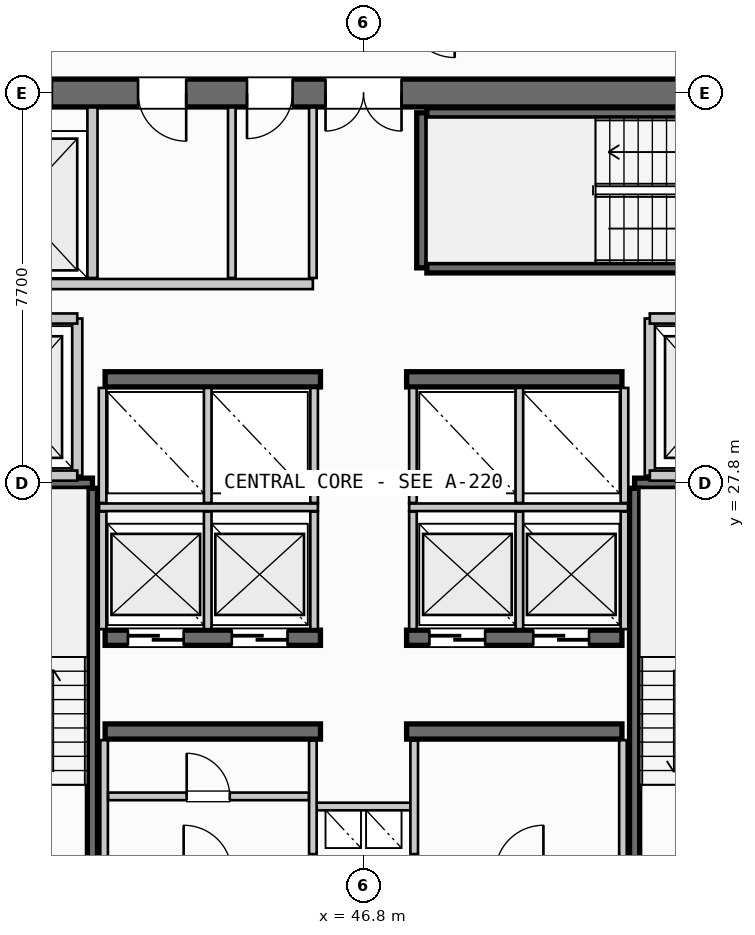
"""IFC4 building model, lengths in metres.
Left out: names, types, materials, properties, quantities, classifications, styles, units other than length and angle.
Written with IfcOpenShell. Run it as: python <this file> out.ifc"""

import sys

from ifc_helpers import new_model, si_unit, direction, frame, frame_2d, origin, place, context, subcontext, project, spatial, rectangle, extrude, source, transform, mapped, element, fill, save


model = new_model("IFC4")
c1 = context("Model", 3, precision=1e-05, world=origin(), true_north=direction((0.0, 1.0)))
c2 = subcontext(c1, "Body", "Model", "MODEL_VIEW")
j1 = project(units=[si_unit("LENGTHUNIT", "METRE"), si_unit("PLANEANGLEUNIT", "RADIAN")], contexts=[c1])
p1 = place(None, origin())
s1 = spatial("IfcSite", under=j1, at=p1, CompositionType="ELEMENT")
p2 = place(p1, origin())
s2 = spatial("IfcBuilding", under=s1, at=p2, CompositionType="ELEMENT")
p3 = place(p2, frame((0.0, 0.0, 146.55)))
s3 = spatial("IfcBuildingStorey", under=s2, at=p3, CompositionType="ELEMENT", Elevation=146.55)
p4 = place(p3, frame((55.6, 35.5, 0.0), z_axis=(0.0, 0.0, 1.0), x_axis=(-1.0, 0.0, 0.0)))
e1 = element("IfcWall", 1, at=p4, inside=s3, PredefinedType="SHEAR", context=c2, shape_type="SweptSolid", body=[
    extrude(rectangle(XDim=17.6, YDim=0.55, at=frame_2d((8.8, 0.0))), origin(), (0.0, 0.0, 1.0), 3.3),
])
p5 = place(p4, frame((8.05, 0.0, 0.0)))
e2 = element("IfcOpeningElement", 2, at=p5, cuts=e1, PredefinedType="OPENING", context=c2, shape_type="SweptSolid", body=[
    extrude(rectangle(XDim=1.5, YDim=2.2, at=frame_2d((0.75, 1.1))), frame((0.0, 0.285, 0.0), z_axis=(0.0, -1.0, 0.0), x_axis=(1.0, 0.0, 0.0)), (0.0, 0.0, 1.0), 0.57),
])
p6 = place(p4, frame((14.95, 0.0, 0.0)))
e3 = element("IfcOpeningElement", 3, at=p6, cuts=e1, PredefinedType="OPENING", context=c2, shape_type="SweptSolid", body=[
    extrude(rectangle(XDim=1.4, YDim=2.3, at=frame_2d((0.7, 1.15))), frame((0.0, 0.285, 0.0), z_axis=(0.0, -1.0, 0.0), x_axis=(1.0, 0.0, 0.0)), (0.0, 0.0, 1.0), 0.57),
])
p7 = place(p4, frame((12.3, 0.0, 0.0)))
e4 = element("IfcOpeningElement", 4, at=p7, cuts=e1, PredefinedType="OPENING", context=c2, shape_type="SweptSolid", body=[
    extrude(rectangle(XDim=0.95, YDim=2.15, at=frame_2d((0.475, 1.075))), frame((0.0, 0.285, 0.0), z_axis=(0.0, -1.0, 0.0), x_axis=(1.0, 0.0, 0.0)), (0.0, 0.0, 1.0), 0.57),
])
p8 = place(p4, frame((10.2, 0.0, 0.0)))
e5 = element("IfcOpeningElement", 5, at=p8, cuts=e1, PredefinedType="OPENING", context=c2, shape_type="SweptSolid", body=[
    extrude(rectangle(XDim=0.9, YDim=2.15, at=frame_2d((0.45, 1.075))), frame((0.0, 0.285, 0.0), z_axis=(0.0, -1.0, 0.0), x_axis=(1.0, 0.0, 0.0)), (0.0, 0.0, 1.0), 0.57),
])
for number, where, z_axis, x_axis in (
    (6, (41.7, 22.9, 0.0), (0.0, 0.0, 1.0), (1.0, 0.0, 0.0)),
    (7, (47.65, 22.9, 0.0), (0.0, 0.0, 1.0), (1.0, 0.0, 0.0)),
):
    element("IfcWall", number, at=place(p3, frame(where, z_axis=z_axis, x_axis=x_axis)), inside=s3, PredefinedType="SHEAR", context=c2, shape_type="SweptSolid", body=[
        extrude(rectangle(XDim=4.25, YDim=0.3, at=frame_2d((2.125, 0.0))), origin(), (0.0, 0.0, 1.0), 3.3),
    ])
p9 = place(p3, frame((41.7, 24.75, 0.0), z_axis=(0.0, 0.0, 1.0), x_axis=(1.0, 0.0, 0.0)))
e8 = element("IfcWall", 8, at=p9, inside=s3, PredefinedType="SHEAR", context=c2, shape_type="SweptSolid", body=[
    extrude(rectangle(XDim=4.25, YDim=0.3, at=frame_2d((2.125, 0.0))), origin(), (0.0, 0.0, 1.0), 3.3),
])
p10 = place(p9, frame((0.45, 0.0, 0.0)))
e9 = element("IfcOpeningElement", 9, at=p10, cuts=e8, PredefinedType="OPENING", context=c2, shape_type="SweptSolid", body=[
    extrude(rectangle(XDim=1.1, YDim=2.2, at=frame_2d((0.55, 1.1))), frame((0.0, 0.16, 0.0), z_axis=(0.0, -1.0, 0.0), x_axis=(1.0, 0.0, 0.0)), (0.0, 0.0, 1.0), 0.32),
])
p11 = place(p9, frame((2.5, 0.0, 0.0)))
e10 = element("IfcOpeningElement", 10, at=p11, cuts=e8, PredefinedType="OPENING", context=c2, shape_type="SweptSolid", body=[
    extrude(rectangle(XDim=1.1, YDim=2.2, at=frame_2d((0.55, 1.1))), frame((0.0, 0.16, 0.0), z_axis=(0.0, -1.0, 0.0), x_axis=(1.0, 0.0, 0.0)), (0.0, 0.0, 1.0), 0.32),
])
p12 = place(p3, frame((47.65, 24.75, 0.0), z_axis=(0.0, 0.0, 1.0), x_axis=(1.0, 0.0, 0.0)))
e11 = element("IfcWall", 11, at=p12, inside=s3, PredefinedType="SHEAR", context=c2, shape_type="SweptSolid", body=[
    extrude(rectangle(XDim=4.25, YDim=0.3, at=frame_2d((2.125, 0.0))), origin(), (0.0, 0.0, 1.0), 3.3),
])
p13 = place(p12, frame((0.45, 0.0, 0.0)))
e12 = element("IfcOpeningElement", 12, at=p13, cuts=e11, PredefinedType="OPENING", context=c2, shape_type="SweptSolid", body=[
    extrude(rectangle(XDim=1.1, YDim=2.2, at=frame_2d((0.55, 1.1))), frame((0.0, 0.16, 0.0), z_axis=(0.0, -1.0, 0.0), x_axis=(1.0, 0.0, 0.0)), (0.0, 0.0, 1.0), 0.32),
])
p14 = place(p12, frame((2.5, 0.0, 0.0)))
e13 = element("IfcOpeningElement", 13, at=p14, cuts=e11, PredefinedType="OPENING", context=c2, shape_type="SweptSolid", body=[
    extrude(rectangle(XDim=1.1, YDim=2.2, at=frame_2d((0.55, 1.1))), frame((0.0, 0.16, 0.0), z_axis=(0.0, -1.0, 0.0), x_axis=(1.0, 0.0, 0.0)), (0.0, 0.0, 1.0), 0.32),
])
for number, where, z_axis, x_axis in (
    (14, (41.7, 29.85, 0.0), (0.0, 0.0, 1.0), (1.0, 0.0, 0.0)),
    (15, (47.65, 29.85, 0.0), (0.0, 0.0, 1.0), (1.0, 0.0, 0.0)),
):
    element("IfcWall", number, at=place(p3, frame(where, z_axis=z_axis, x_axis=x_axis)), inside=s3, PredefinedType="SHEAR", context=c2, shape_type="SweptSolid", body=[
        extrude(rectangle(XDim=4.25, YDim=0.3, at=frame_2d((2.125, 0.0))), origin(), (0.0, 0.0, 1.0), 3.3),
    ])
p15 = place(p3, frame((38.39, 27.8, 0.0), z_axis=(0.0, 0.0, 1.0), x_axis=(1.0, 0.0, 0.0)))
e16 = element("IfcWall", 16, at=p15, inside=s3, PredefinedType="SHEAR", context=c2, shape_type="SweptSolid", body=[
    extrude(rectangle(XDim=3.06, YDim=0.2, at=frame_2d((1.53, 0.0))), origin(), (0.0, 0.0, 1.0), 3.3),
])
p16 = place(p3, frame((41.45, 27.7, 0.0), z_axis=(0.0, 0.0, 1.0), x_axis=(0.0, -1.0, 0.0)))
e17 = element("IfcWall", 17, at=p16, inside=s3, PredefinedType="SHEAR", context=c2, shape_type="SweptSolid", body=[
    extrude(rectangle(XDim=7.35, YDim=0.2, at=frame_2d((3.675, 0.0))), origin(), (0.0, 0.0, 1.0), 3.3),
])
p17 = place(p3, frame((52.15, 27.8, 0.0), z_axis=(0.0, 0.0, 1.0), x_axis=(1.0, 0.0, 0.0)))
e18 = element("IfcWall", 18, at=p17, inside=s3, PredefinedType="SHEAR", context=c2, shape_type="SweptSolid", body=[
    extrude(rectangle(XDim=3.06, YDim=0.2, at=frame_2d((1.53, 0.0))), origin(), (0.0, 0.0, 1.0), 3.3),
])
p18 = place(p3, frame((52.15, 20.35, 0.0), z_axis=(0.0, 0.0, 1.0), x_axis=(0.0, 1.0, 0.0)))
e19 = element("IfcWall", 19, at=p18, inside=s3, PredefinedType="SHEAR", context=c2, shape_type="SweptSolid", body=[
    extrude(rectangle(XDim=7.35, YDim=0.2, at=frame_2d((3.675, 0.0))), origin(), (0.0, 0.0, 1.0), 3.3),
])
p19 = place(p3, frame((47.95, 32.05, 0.0), z_axis=(0.0, 0.0, 1.0), x_axis=(0.0, 1.0, 0.0)))
e20 = element("IfcWall", 20, at=p19, inside=s3, PredefinedType="SHEAR", context=c2, shape_type="SweptSolid", body=[
    extrude(rectangle(XDim=3.06, YDim=0.2, at=frame_2d((1.53, 0.0))), origin(), (0.0, 0.0, 1.0), 3.3),
])
for number, where, z_axis, x_axis in (
    (21, (48.05, 35.11, 0.0), (0.0, 0.0, 1.0), (1.0, 0.0, 0.0)),
    (22, (55.4, 32.05, 0.0), (0.0, 0.0, 1.0), (-1.0, 0.0, 0.0)),
):
    element("IfcWall", number, at=place(p3, frame(where, z_axis=z_axis, x_axis=x_axis)), inside=s3, PredefinedType="SHEAR", context=c2, shape_type="SweptSolid", body=[
        extrude(rectangle(XDim=7.35, YDim=0.2, at=frame_2d((3.675, 0.0))), origin(), (0.0, 0.0, 1.0), 3.3),
    ])
p20 = place(p3, frame((45.8, 21.42, 0.0), z_axis=(0.0, 0.0, 1.0), x_axis=(1.0, 0.0, 0.0)))
e23 = element("IfcWall", 23, at=p20, inside=s3, PredefinedType="PARTITIONING", context=c2, shape_type="SweptSolid", body=[
    extrude(rectangle(XDim=2.0, YDim=0.15, at=frame_2d((1.0, 0.0))), origin(), (0.0, 0.0, 1.0), 2.305),
])
for number, where, z_axis, x_axis in (
    (24, (45.8, 20.48, 0.0), (0.0, 0.0, 1.0), (0.0, 1.0, 0.0)),
    (25, (47.8, 20.48, 0.0), (0.0, 0.0, 1.0), (0.0, 1.0, 0.0)),
):
    element("IfcWall", number, at=place(p3, frame(where, z_axis=z_axis, x_axis=x_axis)), inside=s3, PredefinedType="PARTITIONING", context=c2, shape_type="SweptSolid", body=[
        extrude(rectangle(XDim=2.24, YDim=0.15, at=frame_2d((1.12, 0.0))), origin(), (0.0, 0.0, 1.0), 2.305),
    ])
p21 = place(p3, frame((41.15, 27.95, 0.0), z_axis=(0.0, 0.0, 1.0), x_axis=(0.0, 1.0, 0.0)))
e26 = element("IfcWall", 26, at=p21, inside=s3, PredefinedType="PARTITIONING", context=c2, shape_type="SweptSolid", body=[
    extrude(rectangle(XDim=3.1, YDim=0.2, at=frame_2d((1.55, 0.0))), origin(), (0.0, 0.0, 1.0), 2.305),
])
for number, where, z_axis, x_axis in (
    (27, (38.285, 27.95, 0.0), (0.0, 0.0, 1.0), (1.0, 0.0, 0.0)),
    (28, (38.285, 31.05, 0.0), (0.0, 0.0, 1.0), (1.0, 0.0, 0.0)),
):
    element("IfcWall", number, at=place(p3, frame(where, z_axis=z_axis, x_axis=x_axis)), inside=s3, PredefinedType="PARTITIONING", context=c2, shape_type="SweptSolid", body=[
        extrude(rectangle(XDim=2.865, YDim=0.2, at=frame_2d((1.433, 0.0))), origin(), (0.0, 0.0, 1.0), 2.305),
    ])
p22 = place(p3, frame((52.45, 27.95, 0.0), z_axis=(0.0, 0.0, 1.0), x_axis=(0.0, 1.0, 0.0)))
e29 = element("IfcWall", 29, at=p22, inside=s3, PredefinedType="PARTITIONING", context=c2, shape_type="SweptSolid", body=[
    extrude(rectangle(XDim=3.1, YDim=0.2, at=frame_2d((1.55, 0.0))), origin(), (0.0, 0.0, 1.0), 2.305),
])
for number, where, z_axis, x_axis in (
    (30, (52.45, 27.95, 0.0), (0.0, 0.0, 1.0), (1.0, 0.0, 0.0)),
    (31, (52.45, 31.05, 0.0), (0.0, 0.0, 1.0), (1.0, 0.0, 0.0)),
):
    element("IfcWall", number, at=place(p3, frame(where, z_axis=z_axis, x_axis=x_axis)), inside=s3, PredefinedType="PARTITIONING", context=c2, shape_type="SweptSolid", body=[
        extrude(rectangle(XDim=2.865, YDim=0.2, at=frame_2d((1.433, 0.0))), origin(), (0.0, 0.0, 1.0), 2.305),
    ])
for number, where, z_axis, x_axis in (
    (32, (41.68, 20.385, 0.0), (0.0, 0.0, 1.0), (0.0, 1.0, 0.0)),
    (33, (51.92, 20.385, 0.0), (0.0, 0.0, 1.0), (0.0, 1.0, 0.0)),
):
    element("IfcWall", number, at=place(p3, frame(where, z_axis=z_axis, x_axis=x_axis)), inside=s3, PredefinedType="PARTITIONING", context=c2, shape_type="SweptSolid", body=[
        extrude(rectangle(XDim=2.345, YDim=0.15, at=frame_2d((1.172, 0.0))), origin(), (0.0, 0.0, 1.0), 2.305),
    ])
p23 = place(p3, frame((41.76, 21.62, 0.0), z_axis=(0.0, 0.0, 1.0), x_axis=(1.0, 0.0, 0.0)))
e34 = element("IfcWall", 34, at=p23, inside=s3, PredefinedType="PARTITIONING", context=c2, shape_type="SweptSolid", body=[
    extrude(rectangle(XDim=3.96, YDim=0.15, at=frame_2d((1.98, 0.0))), origin(), (0.0, 0.0, 1.0), 2.305),
])
p24 = place(p23, frame((1.55, 0.0, 0.0)))
e35 = element("IfcOpeningElement", 35, at=p24, cuts=e34, PredefinedType="OPENING", context=c2, shape_type="SweptSolid", body=[
    extrude(rectangle(XDim=0.85, YDim=2.15, at=frame_2d((0.425, 1.075))), frame((0.0, 0.085, 0.0), z_axis=(0.0, -1.0, 0.0), x_axis=(1.0, 0.0, 0.0)), (0.0, 0.0, 1.0), 0.17),
])
p25 = place(p3, frame((41.58, 27.325, 0.0), z_axis=(0.0, 0.0, 1.0), x_axis=(1.0, 0.0, 0.0)))
e36 = element("IfcWall", 36, at=p25, inside=s3, PredefinedType="PARTITIONING", context=c2, shape_type="SweptSolid", body=[
    extrude(rectangle(XDim=4.32, YDim=0.15, at=frame_2d((2.16, 0.0))), origin(), (0.0, 0.0, 1.0), 2.305),
])
p26 = place(p3, frame((47.7, 27.325, 0.0), z_axis=(0.0, 0.0, 1.0), x_axis=(1.0, 0.0, 0.0)))
e37 = element("IfcWall", 37, at=p26, inside=s3, PredefinedType="PARTITIONING", context=c2, shape_type="SweptSolid", body=[
    extrude(rectangle(XDim=4.32, YDim=0.15, at=frame_2d((2.16, 0.0))), origin(), (0.0, 0.0, 1.0), 2.305),
])
for number, where, z_axis, x_axis in (
    (38, (41.65, 24.92, 0.0), (0.0, 0.0, 1.0), (0.0, 1.0, 0.0)),
    (39, (43.725, 24.92, 0.0), (0.0, 0.0, 1.0), (0.0, 1.0, 0.0)),
    (40, (45.825, 24.92, 0.0), (0.0, 0.0, 1.0), (0.0, 1.0, 0.0)),
    (41, (47.775, 24.92, 0.0), (0.0, 0.0, 1.0), (0.0, 1.0, 0.0)),
    (42, (49.875, 24.92, 0.0), (0.0, 0.0, 1.0), (0.0, 1.0, 0.0)),
    (43, (51.95, 24.92, 0.0), (0.0, 0.0, 1.0), (0.0, 1.0, 0.0)),
):
    element("IfcWall", number, at=place(p3, frame(where, z_axis=z_axis, x_axis=x_axis)), inside=s3, PredefinedType="PARTITIONING", context=c2, shape_type="SweptSolid", body=[
        extrude(rectangle(XDim=2.32, YDim=0.15, at=frame_2d((1.16, 0.0))), origin(), (0.0, 0.0, 1.0), 2.305),
    ])
for number, where, z_axis, x_axis in (
    (44, (41.65, 27.41, 0.0), (0.0, 0.0, 1.0), (0.0, 1.0, 0.0)),
    (45, (43.725, 27.41, 0.0), (0.0, 0.0, 1.0), (0.0, 1.0, 0.0)),
    (46, (45.825, 27.41, 0.0), (0.0, 0.0, 1.0), (0.0, 1.0, 0.0)),
    (47, (47.775, 27.41, 0.0), (0.0, 0.0, 1.0), (0.0, 1.0, 0.0)),
    (48, (49.875, 27.41, 0.0), (0.0, 0.0, 1.0), (0.0, 1.0, 0.0)),
    (49, (51.95, 27.41, 0.0), (0.0, 0.0, 1.0), (0.0, 1.0, 0.0)),
):
    element("IfcWall", number, at=place(p3, frame(where, z_axis=z_axis, x_axis=x_axis)), inside=s3, PredefinedType="PARTITIONING", context=c2, shape_type="SweptSolid", body=[
        extrude(rectangle(XDim=2.27, YDim=0.15, at=frame_2d((1.135, 0.0))), origin(), (0.0, 0.0, 1.0), 2.305),
    ])
p27 = place(p3, frame((41.45, 31.85, 0.0), z_axis=(0.0, 0.0, 1.0), x_axis=(0.0, 1.0, 0.0)))
e50 = element("IfcWall", 50, at=p27, inside=s3, PredefinedType="PARTITIONING", context=c2, shape_type="SweptSolid", body=[
    extrude(rectangle(XDim=3.365, YDim=0.2, at=frame_2d((1.683, 0.0))), origin(), (0.0, 0.0, 1.0), 2.305),
])
p28 = place(p3, frame((38.285, 31.73, 0.0), z_axis=(0.0, 0.0, 1.0), x_axis=(1.0, 0.0, 0.0)))
e51 = element("IfcWall", 51, at=p28, inside=s3, PredefinedType="PARTITIONING", context=c2, shape_type="SweptSolid", body=[
    extrude(rectangle(XDim=7.515, YDim=0.2, at=frame_2d((3.758, 0.0))), origin(), (0.0, 0.0, 1.0), 2.305),
])
p29 = place(p3, frame((45.8, 31.85, 0.0), z_axis=(0.0, 0.0, 1.0), x_axis=(0.0, 1.0, 0.0)))
e52 = element("IfcWall", 52, at=p29, inside=s3, PredefinedType="PARTITIONING", context=c2, shape_type="SweptSolid", body=[
    extrude(rectangle(XDim=3.365, YDim=0.15, at=frame_2d((1.683, 0.0))), origin(), (0.0, 0.0, 1.0), 2.305),
])
p30 = place(p3, frame((44.2, 31.85, 0.0), z_axis=(0.0, 0.0, 1.0), x_axis=(0.0, 1.0, 0.0)))
e53 = element("IfcWall", 53, at=p30, inside=s3, PredefinedType="PLUMBINGWALL", context=c2, shape_type="SweptSolid", body=[
    extrude(rectangle(XDim=3.365, YDim=0.15, at=frame_2d((1.683, 0.0))), origin(), (0.0, 0.0, 1.0), 2.305),
])
m1 = source(origin(), c2, "Body", "SweptSolid", [
    extrude(rectangle(XDim=1.5, YDim=2.2, at=frame_2d((0.75, 1.1))), frame((0.0, 0.025, 0.0), z_axis=(0.0, -1.0, 0.0), x_axis=(1.0, 0.0, 0.0)), (0.0, 0.0, 1.0), 0.05),
])
p31 = place(p5, origin())
e54 = element("IfcDoor", 54, at=p31, inside=s3, OperationType="DOUBLE_DOOR_SINGLE_SWING", PredefinedType="DOOR", context=c2, shape_type="MappedRepresentation", body=[
    mapped(m1, transform((0.0, 0.0, 0.0), scale=1.0)),
])
fill(e2, e54)
m2 = source(origin(), c2, "Body", "SweptSolid", [
    extrude(rectangle(XDim=1.1, YDim=2.2, at=frame_2d((0.55, 1.1))), frame((0.0, 0.025, 0.0), z_axis=(0.0, -1.0, 0.0), x_axis=(1.0, 0.0, 0.0)), (0.0, 0.0, 1.0), 0.05),
])
p32 = place(p10, origin())
e55 = element("IfcDoor", 55, at=p32, inside=s3, OperationType="SLIDING_TO_RIGHT", PredefinedType="DOOR", context=c2, shape_type="MappedRepresentation", body=[
    mapped(m2, transform((0.0, 0.0, 0.0), scale=1.0)),
])
fill(e9, e55)
p33 = place(p11, origin())
e56 = element("IfcDoor", 56, at=p33, inside=s3, OperationType="SLIDING_TO_RIGHT", PredefinedType="DOOR", context=c2, shape_type="MappedRepresentation", body=[
    mapped(m2, transform((0.0, 0.0, 0.0), scale=1.0)),
])
fill(e10, e56)
p34 = place(p13, origin())
e57 = element("IfcDoor", 57, at=p34, inside=s3, OperationType="SLIDING_TO_RIGHT", PredefinedType="DOOR", context=c2, shape_type="MappedRepresentation", body=[
    mapped(m2, transform((0.0, 0.0, 0.0), scale=1.0)),
])
fill(e12, e57)
p35 = place(p14, origin())
e58 = element("IfcDoor", 58, at=p35, inside=s3, OperationType="SLIDING_TO_RIGHT", PredefinedType="DOOR", context=c2, shape_type="MappedRepresentation", body=[
    mapped(m2, transform((0.0, 0.0, 0.0), scale=1.0)),
])
fill(e13, e58)
m3 = source(origin(), c2, "Body", "SweptSolid", [
    extrude(rectangle(XDim=1.4, YDim=2.3, at=frame_2d((0.7, 1.15))), frame((0.0, 0.025, 0.0), z_axis=(0.0, -1.0, 0.0), x_axis=(1.0, 0.0, 0.0)), (0.0, 0.0, 1.0), 0.05),
])
p36 = place(p6, origin())
e59 = element("IfcDoor", 59, at=p36, inside=s3, OperationType="SLIDING_TO_RIGHT", PredefinedType="DOOR", context=c2, shape_type="MappedRepresentation", body=[
    mapped(m3, transform((0.0, 0.0, 0.0), scale=1.0)),
])
fill(e3, e59)
m4 = source(origin(), c2, "Body", "SweptSolid", [
    extrude(rectangle(XDim=0.95, YDim=2.15, at=frame_2d((0.475, 1.075))), frame((0.0, 0.025, 0.0), z_axis=(0.0, -1.0, 0.0), x_axis=(1.0, 0.0, 0.0)), (0.0, 0.0, 1.0), 0.05),
])
p37 = place(p7, origin())
e60 = element("IfcDoor", 60, at=p37, inside=s3, OperationType="SINGLE_SWING_LEFT", PredefinedType="DOOR", context=c2, shape_type="MappedRepresentation", body=[
    mapped(m4, transform((0.0, 0.0, 0.0), scale=1.0)),
])
fill(e4, e60)
m5 = source(origin(), c2, "Body", "SweptSolid", [
    extrude(rectangle(XDim=0.9, YDim=2.15, at=frame_2d((0.45, 1.075))), frame((0.0, 0.025, 0.0), z_axis=(0.0, -1.0, 0.0), x_axis=(1.0, 0.0, 0.0)), (0.0, 0.0, 1.0), 0.05),
])
p38 = place(p8, origin())
e61 = element("IfcDoor", 61, at=p38, inside=s3, OperationType="SINGLE_SWING_RIGHT", PredefinedType="DOOR", context=c2, shape_type="MappedRepresentation", body=[
    mapped(m5, transform((0.0, 0.0, 0.0), scale=1.0)),
])
fill(e5, e61)
m6 = source(origin(), c2, "Body", "SweptSolid", [
    extrude(rectangle(XDim=0.85, YDim=2.15, at=frame_2d((0.425, 1.075))), frame((0.0, 0.025, 0.0), z_axis=(0.0, -1.0, 0.0), x_axis=(1.0, 0.0, 0.0)), (0.0, 0.0, 1.0), 0.05),
])
p39 = place(p24, origin())
e62 = element("IfcDoor", 62, at=p39, inside=s3, OperationType="SINGLE_SWING_LEFT", PredefinedType="DOOR", context=c2, shape_type="MappedRepresentation", body=[
    mapped(m6, transform((0.0, 0.0, 0.0), scale=1.0)),
])
fill(e35, e62)
save(model, sys.argv[1])
